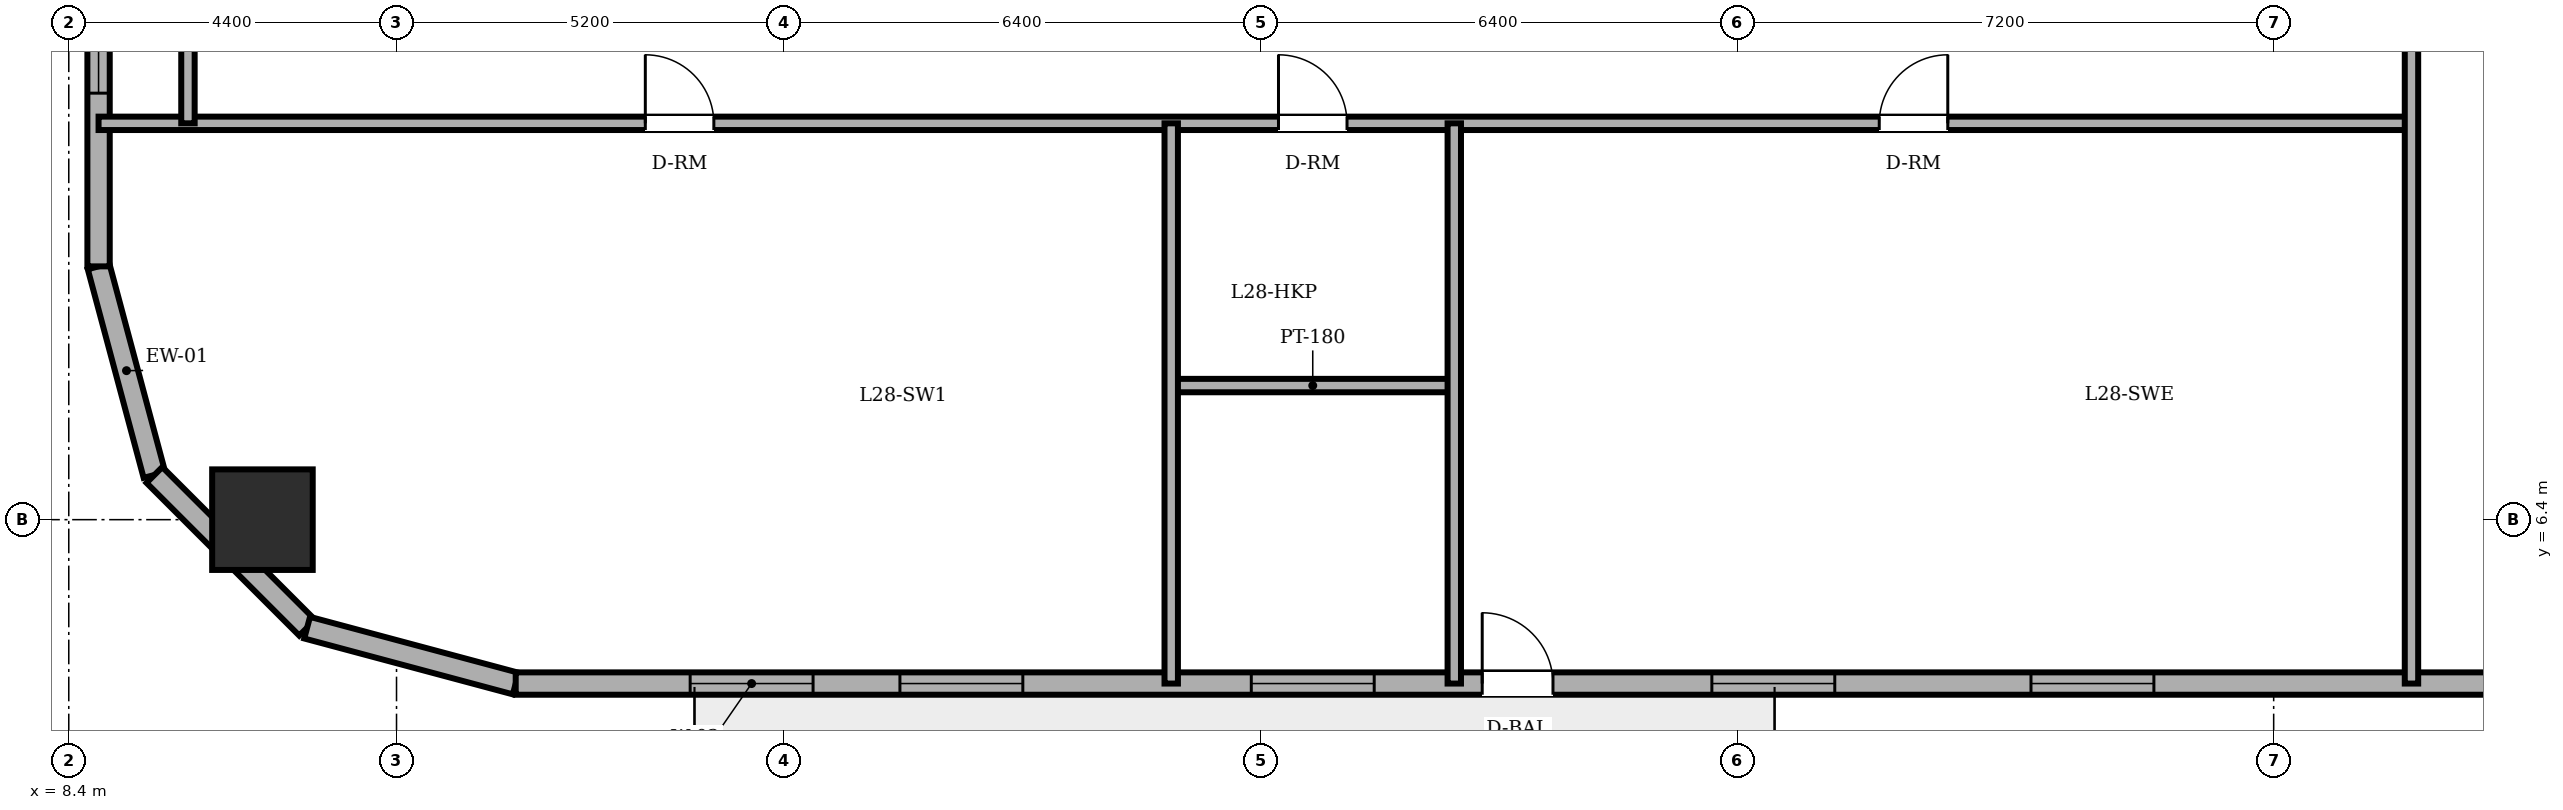
"""IFC4 building model, lengths in metres.
Left out: names, types, materials, properties, quantities, classifications, styles, units other than length and angle.
Written with IfcOpenShell. Run it as: python <this file> out.ifc"""

import sys

from ifc_helpers import new_model, si_unit, direction, frame, frame_2d, origin, origin_2d, place, context, subcontext, project, spatial, rectangle, circle, extrude, element, fill, save


model = new_model("IFC4")
c1 = context("Model", 3, precision=1e-05, world=origin(), true_north=direction((0.0, 1.0)))
c2 = subcontext(c1, "Body", "Model", "MODEL_VIEW")
j1 = project(units=[si_unit("LENGTHUNIT", "METRE"), si_unit("PLANEANGLEUNIT", "RADIAN")], contexts=[c1])
p1 = place(None, origin())
s1 = spatial("IfcSite", under=j1, at=p1, CompositionType="ELEMENT")
p2 = place(p1, origin())
s2 = spatial("IfcBuilding", under=s1, at=p2, CompositionType="ELEMENT")
p3 = place(p2, frame((0.0, 0.0, 107.9)))
s3 = spatial("IfcBuildingStorey", under=s2, at=p3, CompositionType="ELEMENT", Elevation=107.9)
p4 = place(p3, frame((11.0, 6.4, 0.0), z_axis=(0.0, 0.0, 1.0), x_axis=(1.0, 0.0, 0.0)))
e1 = element("IfcColumn", 1, at=p4, inside=s3, PredefinedType="COLUMN", context=c2, shape_type="SweptSolid", body=[
    extrude(circle(Radius=0.675, at=origin_2d()), origin(), (0.0, 0.0, 1.0), 3.6),
])
p5 = place(p3, frame((8.8, 9.8, 0.0), z_axis=(0.0, 0.0, 1.0), x_axis=(0.258731875344, -0.96594917914, 0.0)))
e2 = element("IfcWall", 2, at=p5, inside=s3, PredefinedType="SOLIDWALL", context=c2, shape_type="SweptSolid", body=[
    extrude(rectangle(XDim=2.899, YDim=0.3, at=frame_2d((1.449, 0.0))), origin(), (0.0, 0.0, 1.0), 3.4),
])
p6 = place(p3, frame((9.55, 7.0, 0.0), z_axis=(0.0, 0.0, 1.0), x_axis=(0.707106781187, -0.707106781187, 0.0)))
e3 = element("IfcWall", 3, at=p6, inside=s3, PredefinedType="SOLIDWALL", context=c2, shape_type="SweptSolid", body=[
    extrude(rectangle(XDim=2.899, YDim=0.3, at=frame_2d((1.45, 0.0))), origin(), (0.0, 0.0, 1.0), 3.4),
])
p7 = place(p3, frame((11.6, 4.95, 0.0), z_axis=(0.0, 0.0, 1.0), x_axis=(0.965943540406, -0.258752926066, 0.0)))
e4 = element("IfcWall", 4, at=p7, inside=s3, PredefinedType="SOLIDWALL", context=c2, shape_type="SweptSolid", body=[
    extrude(rectangle(XDim=2.898, YDim=0.3, at=frame_2d((1.449, 0.0))), origin(), (0.0, 0.0, 1.0), 3.4),
])
p8 = place(p3, frame((14.4, 4.2, 0.0), z_axis=(0.0, 0.0, 1.0), x_axis=(1.0, 0.0, 0.0)))
e5 = element("IfcWall", 5, at=p8, inside=s3, PredefinedType="SOLIDWALL", context=c2, shape_type="SweptSolid", body=[
    extrude(rectangle(XDim=29.933, YDim=0.3, at=frame_2d((14.967, 0.0))), origin(), (0.0, 0.0, 1.0), 3.4),
])
p9 = place(p8, frame((12.975, 0.0, 0.0)))
e6 = element("IfcOpeningElement", 6, at=p9, cuts=e5, PredefinedType="OPENING", context=c2, shape_type="SweptSolid", body=[
    extrude(rectangle(XDim=0.95, YDim=2.2, at=frame_2d((0.475, 1.1))), frame((0.0, 0.16, 0.0), z_axis=(0.0, -1.0, 0.0), x_axis=(1.0, 0.0, 0.0)), (0.0, 0.0, 1.0), 0.32),
])
p10 = place(p8, frame((2.342, 0.0, 0.85)))
e7 = element("IfcOpeningElement", 7, at=p10, cuts=e5, PredefinedType="OPENING", context=c2, shape_type="SweptSolid", body=[
    extrude(rectangle(XDim=1.65, YDim=1.55, at=frame_2d((0.825, 0.775))), frame((0.0, 0.16, 0.0), z_axis=(0.0, -1.0, 0.0), x_axis=(1.0, 0.0, 0.0)), (0.0, 0.0, 1.0), 0.32),
])
p11 = place(p8, frame((5.158, 0.0, 0.85)))
e8 = element("IfcOpeningElement", 8, at=p11, cuts=e5, PredefinedType="OPENING", context=c2, shape_type="SweptSolid", body=[
    extrude(rectangle(XDim=1.65, YDim=1.55, at=frame_2d((0.825, 0.775))), frame((0.0, 0.16, 0.0), z_axis=(0.0, -1.0, 0.0), x_axis=(1.0, 0.0, 0.0)), (0.0, 0.0, 1.0), 0.32),
])
p12 = place(p8, frame((9.875, 0.0, 0.85)))
e9 = element("IfcOpeningElement", 9, at=p12, cuts=e5, PredefinedType="OPENING", context=c2, shape_type="SweptSolid", body=[
    extrude(rectangle(XDim=1.65, YDim=1.55, at=frame_2d((0.825, 0.775))), frame((0.0, 0.16, 0.0), z_axis=(0.0, -1.0, 0.0), x_axis=(1.0, 0.0, 0.0)), (0.0, 0.0, 1.0), 0.32),
])
p13 = place(p8, frame((16.058, 0.0, 0.85)))
e10 = element("IfcOpeningElement", 10, at=p13, cuts=e5, PredefinedType="OPENING", context=c2, shape_type="SweptSolid", body=[
    extrude(rectangle(XDim=1.65, YDim=1.55, at=frame_2d((0.825, 0.775))), frame((0.0, 0.16, 0.0), z_axis=(0.0, -1.0, 0.0), x_axis=(1.0, 0.0, 0.0)), (0.0, 0.0, 1.0), 0.32),
])
p14 = place(p8, frame((20.342, 0.0, 0.85)))
e11 = element("IfcOpeningElement", 11, at=p14, cuts=e5, PredefinedType="OPENING", context=c2, shape_type="SweptSolid", body=[
    extrude(rectangle(XDim=1.65, YDim=1.55, at=frame_2d((0.825, 0.775))), frame((0.0, 0.16, 0.0), z_axis=(0.0, -1.0, 0.0), x_axis=(1.0, 0.0, 0.0)), (0.0, 0.0, 1.0), 0.32),
])
p15 = place(p8, frame((26.692, 0.0, 0.85)))
e12 = element("IfcOpeningElement", 12, at=p15, cuts=e5, PredefinedType="OPENING", context=c2, shape_type="SweptSolid", body=[
    extrude(rectangle(XDim=1.65, YDim=1.55, at=frame_2d((0.825, 0.775))), frame((0.0, 0.16, 0.0), z_axis=(0.0, -1.0, 0.0), x_axis=(1.0, 0.0, 0.0)), (0.0, 0.0, 1.0), 0.32),
])
p16 = place(p3, frame((8.8, 38.2, 0.0), z_axis=(0.0, 0.0, 1.0), x_axis=(0.0, -1.0, 0.0)))
e13 = element("IfcWall", 13, at=p16, inside=s3, PredefinedType="SOLIDWALL", context=c2, shape_type="SweptSolid", body=[
    extrude(rectangle(XDim=28.4, YDim=0.3, at=frame_2d((14.2, 0.0))), origin(), (0.0, 0.0, 1.0), 3.4),
])
p17 = place(p16, frame((2.325, 0.0, 0.85)))
e14 = element("IfcOpeningElement", 14, at=p17, cuts=e13, PredefinedType="OPENING", context=c2, shape_type="SweptSolid", body=[
    extrude(rectangle(XDim=1.65, YDim=1.55, at=frame_2d((0.825, 0.775))), frame((0.0, 0.16, 0.0), z_axis=(0.0, -1.0, 0.0), x_axis=(1.0, 0.0, 0.0)), (0.0, 0.0, 1.0), 0.32),
])
p18 = place(p16, frame((7.328, 0.0, 0.85)))
e15 = element("IfcOpeningElement", 15, at=p18, cuts=e13, PredefinedType="OPENING", context=c2, shape_type="SweptSolid", body=[
    extrude(rectangle(XDim=1.65, YDim=1.55, at=frame_2d((0.825, 0.775))), frame((0.0, 0.16, 0.0), z_axis=(0.0, -1.0, 0.0), x_axis=(1.0, 0.0, 0.0)), (0.0, 0.0, 1.0), 0.32),
])
p19 = place(p16, frame((11.102, 0.0, 0.85)))
e16 = element("IfcOpeningElement", 16, at=p19, cuts=e13, PredefinedType="OPENING", context=c2, shape_type="SweptSolid", body=[
    extrude(rectangle(XDim=1.65, YDim=1.55, at=frame_2d((0.825, 0.775))), frame((0.0, 0.16, 0.0), z_axis=(0.0, -1.0, 0.0), x_axis=(1.0, 0.0, 0.0)), (0.0, 0.0, 1.0), 0.32),
])
p20 = place(p16, frame((17.648, 0.0, 0.85)))
e17 = element("IfcOpeningElement", 17, at=p20, cuts=e13, PredefinedType="OPENING", context=c2, shape_type="SweptSolid", body=[
    extrude(rectangle(XDim=1.65, YDim=1.55, at=frame_2d((0.825, 0.775))), frame((0.0, 0.16, 0.0), z_axis=(0.0, -1.0, 0.0), x_axis=(1.0, 0.0, 0.0)), (0.0, 0.0, 1.0), 0.32),
])
p21 = place(p16, frame((20.422, 0.0, 0.85)))
e18 = element("IfcOpeningElement", 18, at=p21, cuts=e13, PredefinedType="OPENING", context=c2, shape_type="SweptSolid", body=[
    extrude(rectangle(XDim=1.65, YDim=1.55, at=frame_2d((0.825, 0.775))), frame((0.0, 0.16, 0.0), z_axis=(0.0, -1.0, 0.0), x_axis=(1.0, 0.0, 0.0)), (0.0, 0.0, 1.0), 0.32),
])
p22 = place(p16, frame((24.425, 0.0, 0.85)))
e19 = element("IfcOpeningElement", 19, at=p22, cuts=e13, PredefinedType="OPENING", context=c2, shape_type="SweptSolid", body=[
    extrude(rectangle(XDim=1.65, YDim=1.55, at=frame_2d((0.825, 0.775))), frame((0.0, 0.16, 0.0), z_axis=(0.0, -1.0, 0.0), x_axis=(1.0, 0.0, 0.0)), (0.0, 0.0, 1.0), 0.32),
])
p23 = place(p3, frame((23.2, 8.2, 0.0), z_axis=(0.0, 0.0, 1.0), x_axis=(1.0, 0.0, 0.0)))
e20 = element("IfcWall", 20, at=p23, inside=s3, PredefinedType="PARTITIONING", context=c2, shape_type="SweptSolid", body=[
    extrude(rectangle(XDim=3.8, YDim=0.18, at=frame_2d((1.9, 0.0))), origin(), (0.0, 0.0, 1.0), 3.4),
])
p24 = place(p3, frame((8.8, 11.72, 0.0), z_axis=(0.0, 0.0, 1.0), x_axis=(1.0, 0.0, 0.0)))
e21 = element("IfcWall", 21, at=p24, inside=s3, PredefinedType="PARTITIONING", context=c2, shape_type="SweptSolid", body=[
    extrude(rectangle(XDim=31.05, YDim=0.18, at=frame_2d((15.525, 0.0))), origin(), (0.0, 0.0, 1.0), 3.4),
])
p25 = place(p24, frame((15.84, 0.0, 0.0)))
e22 = element("IfcOpeningElement", 22, at=p25, cuts=e21, PredefinedType="OPENING", context=c2, shape_type="SweptSolid", body=[
    extrude(rectangle(XDim=0.92, YDim=2.1, at=frame_2d((0.46, 1.05))), frame((0.0, 0.1, 0.0), z_axis=(0.0, -1.0, 0.0), x_axis=(1.0, 0.0, 0.0)), (0.0, 0.0, 1.0), 0.2),
])
p26 = place(p24, frame((7.34, 0.0, 0.0)))
e23 = element("IfcOpeningElement", 23, at=p26, cuts=e21, PredefinedType="OPENING", context=c2, shape_type="SweptSolid", body=[
    extrude(rectangle(XDim=0.92, YDim=2.1, at=frame_2d((0.46, 1.05))), frame((0.0, 0.1, 0.0), z_axis=(0.0, -1.0, 0.0), x_axis=(1.0, 0.0, 0.0)), (0.0, 0.0, 1.0), 0.2),
])
p27 = place(p24, frame((23.905, 0.0, 0.0)))
e24 = element("IfcOpeningElement", 24, at=p27, cuts=e21, PredefinedType="OPENING", context=c2, shape_type="SweptSolid", body=[
    extrude(rectangle(XDim=0.92, YDim=2.1, at=frame_2d((0.46, 1.05))), frame((0.0, 0.1, 0.0), z_axis=(0.0, -1.0, 0.0), x_axis=(1.0, 0.0, 0.0)), (0.0, 0.0, 1.0), 0.2),
])
p28 = place(p3, frame((10.0, 11.72, 0.0), z_axis=(0.0, 0.0, 1.0), x_axis=(0.0, 1.0, 0.0)))
e25 = element("IfcWall", 25, at=p28, inside=s3, PredefinedType="PARTITIONING", context=c2, shape_type="SweptSolid", body=[
    extrude(rectangle(XDim=2.46, YDim=0.18, at=frame_2d((1.23, 0.0))), origin(), (0.0, 0.0, 1.0), 3.4),
])
for number, where, z_axis, x_axis in (
    (26, (23.2, 4.2, 0.0), (0.0, 0.0, 1.0), (0.0, 1.0, 0.0)),
    (27, (27.0, 4.2, 0.0), (0.0, 0.0, 1.0), (0.0, 1.0, 0.0)),
):
    element("IfcWall", number, at=place(p3, frame(where, z_axis=z_axis, x_axis=x_axis)), inside=s3, PredefinedType="PARTITIONING", context=c2, shape_type="SweptSolid", body=[
        extrude(rectangle(XDim=7.52, YDim=0.18, at=frame_2d((3.76, 0.0))), origin(), (0.0, 0.0, 1.0), 3.4),
    ])
p29 = place(p3, frame((39.85, 4.2, 0.0), z_axis=(0.0, 0.0, 1.0), x_axis=(0.0, 1.0, 0.0)))
e28 = element("IfcWall", 28, at=p29, inside=s3, PredefinedType="PARTITIONING", context=c2, shape_type="SweptSolid", body=[
    extrude(rectangle(XDim=18.62, YDim=0.18, at=frame_2d((9.31, 0.0))), origin(), (0.0, 0.0, 1.0), 3.4),
])
p30 = place(p29, frame((12.31, 0.0, 0.0)))
e29 = element("IfcOpeningElement", 29, at=p30, cuts=e28, PredefinedType="OPENING", context=c2, shape_type="SweptSolid", body=[
    extrude(rectangle(XDim=1.0, YDim=2.15, at=frame_2d((0.5, 1.075))), frame((0.0, 0.1, 0.0), z_axis=(0.0, -1.0, 0.0), x_axis=(1.0, 0.0, 0.0)), (0.0, 0.0, 1.0), 0.2),
])
p31 = place(p9, origin())
e30 = element("IfcDoor", 30, at=p31, inside=s3, OperationType="SINGLE_SWING_LEFT", PredefinedType="DOOR", context=c2, shape_type="SweptSolid", body=[
    extrude(rectangle(XDim=0.95, YDim=2.2, at=frame_2d((0.475, 1.1))), frame((0.0, 0.025, 0.0), z_axis=(0.0, -1.0, 0.0), x_axis=(1.0, 0.0, 0.0)), (0.0, 0.0, 1.0), 0.05),
])
fill(e6, e30)
p32 = place(p10, origin())
e31 = element("IfcWindow", 31, at=p32, inside=s3, PartitioningType="DOUBLE_PANEL_VERTICAL", PredefinedType="WINDOW", context=c2, shape_type="SweptSolid", body=[
    extrude(rectangle(XDim=1.65, YDim=1.55, at=frame_2d((0.825, 0.775))), frame((0.0, 0.03, 0.0), z_axis=(0.0, -1.0, 0.0), x_axis=(1.0, 0.0, 0.0)), (0.0, 0.0, 1.0), 0.06),
])
fill(e7, e31)
p33 = place(p11, origin())
e32 = element("IfcWindow", 32, at=p33, inside=s3, PartitioningType="DOUBLE_PANEL_VERTICAL", PredefinedType="WINDOW", context=c2, shape_type="SweptSolid", body=[
    extrude(rectangle(XDim=1.65, YDim=1.55, at=frame_2d((0.825, 0.775))), frame((0.0, 0.03, 0.0), z_axis=(0.0, -1.0, 0.0), x_axis=(1.0, 0.0, 0.0)), (0.0, 0.0, 1.0), 0.06),
])
fill(e8, e32)
p34 = place(p12, origin())
e33 = element("IfcWindow", 33, at=p34, inside=s3, PartitioningType="DOUBLE_PANEL_VERTICAL", PredefinedType="WINDOW", context=c2, shape_type="SweptSolid", body=[
    extrude(rectangle(XDim=1.65, YDim=1.55, at=frame_2d((0.825, 0.775))), frame((0.0, 0.03, 0.0), z_axis=(0.0, -1.0, 0.0), x_axis=(1.0, 0.0, 0.0)), (0.0, 0.0, 1.0), 0.06),
])
fill(e9, e33)
p35 = place(p13, origin())
e34 = element("IfcWindow", 34, at=p35, inside=s3, PartitioningType="DOUBLE_PANEL_VERTICAL", PredefinedType="WINDOW", context=c2, shape_type="SweptSolid", body=[
    extrude(rectangle(XDim=1.65, YDim=1.55, at=frame_2d((0.825, 0.775))), frame((0.0, 0.03, 0.0), z_axis=(0.0, -1.0, 0.0), x_axis=(1.0, 0.0, 0.0)), (0.0, 0.0, 1.0), 0.06),
])
fill(e10, e34)
p36 = place(p14, origin())
e35 = element("IfcWindow", 35, at=p36, inside=s3, PartitioningType="DOUBLE_PANEL_VERTICAL", PredefinedType="WINDOW", context=c2, shape_type="SweptSolid", body=[
    extrude(rectangle(XDim=1.65, YDim=1.55, at=frame_2d((0.825, 0.775))), frame((0.0, 0.03, 0.0), z_axis=(0.0, -1.0, 0.0), x_axis=(1.0, 0.0, 0.0)), (0.0, 0.0, 1.0), 0.06),
])
fill(e11, e35)
p37 = place(p22, origin())
e36 = element("IfcWindow", 36, at=p37, inside=s3, PartitioningType="DOUBLE_PANEL_VERTICAL", PredefinedType="WINDOW", context=c2, shape_type="SweptSolid", body=[
    extrude(rectangle(XDim=1.65, YDim=1.55, at=frame_2d((0.825, 0.775))), frame((0.0, 0.03, 0.0), z_axis=(0.0, -1.0, 0.0), x_axis=(1.0, 0.0, 0.0)), (0.0, 0.0, 1.0), 0.06),
])
fill(e19, e36)
p38 = place(p25, origin())
e37 = element("IfcDoor", 37, at=p38, inside=s3, OperationType="SINGLE_SWING_LEFT", PredefinedType="DOOR", context=c2, shape_type="SweptSolid", body=[
    extrude(rectangle(XDim=0.92, YDim=2.1, at=frame_2d((0.46, 1.05))), frame((0.0, 0.025, 0.0), z_axis=(0.0, -1.0, 0.0), x_axis=(1.0, 0.0, 0.0)), (0.0, 0.0, 1.0), 0.05),
])
fill(e22, e37)
p39 = place(p26, origin())
e38 = element("IfcDoor", 38, at=p39, inside=s3, OperationType="SINGLE_SWING_LEFT", PredefinedType="DOOR", context=c2, shape_type="SweptSolid", body=[
    extrude(rectangle(XDim=0.92, YDim=2.1, at=frame_2d((0.46, 1.05))), frame((0.0, 0.025, 0.0), z_axis=(0.0, -1.0, 0.0), x_axis=(1.0, 0.0, 0.0)), (0.0, 0.0, 1.0), 0.05),
])
fill(e23, e38)
p40 = place(p27, origin())
e39 = element("IfcDoor", 39, at=p40, inside=s3, OperationType="SINGLE_SWING_RIGHT", PredefinedType="DOOR", context=c2, shape_type="SweptSolid", body=[
    extrude(rectangle(XDim=0.92, YDim=2.1, at=frame_2d((0.46, 1.05))), frame((0.0, 0.025, 0.0), z_axis=(0.0, -1.0, 0.0), x_axis=(1.0, 0.0, 0.0)), (0.0, 0.0, 1.0), 0.05),
])
fill(e24, e39)
save(model, sys.argv[1])
